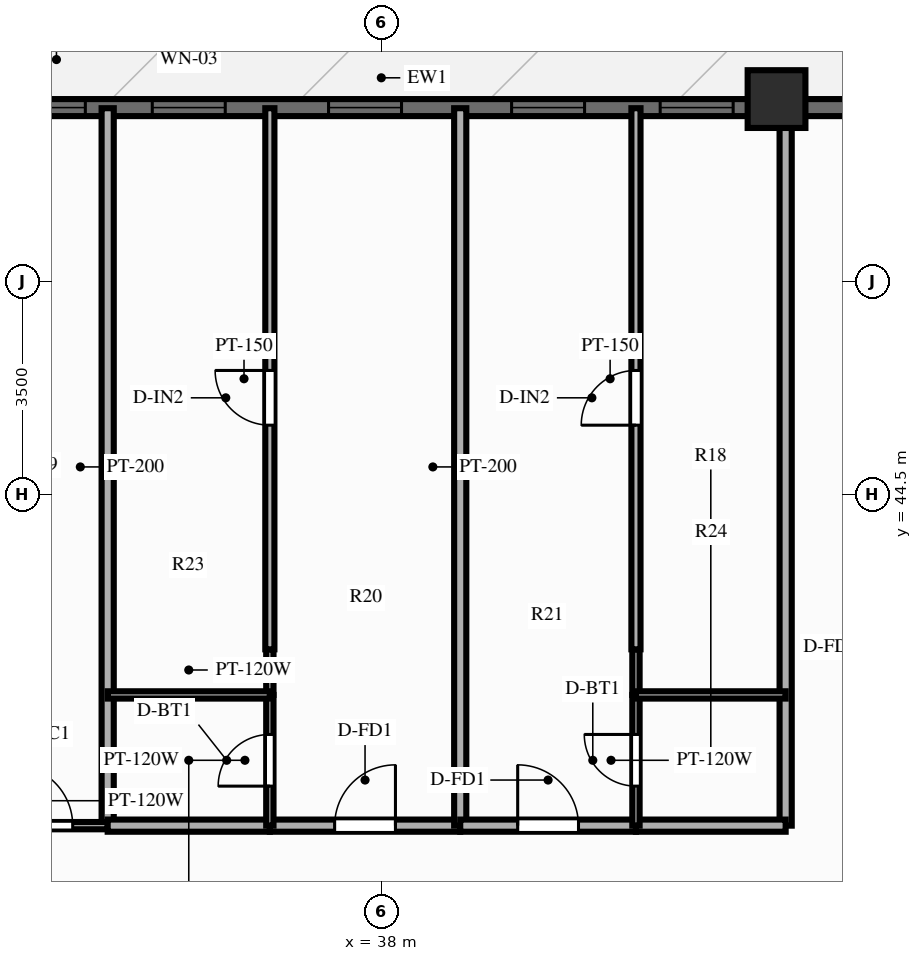
"""IFC4 building model, lengths in metres.
Left out: names, types, materials, properties, quantities, classifications, styles, units other than length and angle.
Written with IfcOpenShell. Run it as: python <this file> out.ifc"""

import sys

from ifc_helpers import new_model, si_unit, direction, frame, frame_2d, origin, origin_2d, place, context, subcontext, project, spatial, rectangle, extrude, source, transform, mapped, element, fill, save


model = new_model("IFC4")
c1 = context("Model", 3, precision=1e-05, world=origin(), true_north=direction((0.0, 1.0)))
c2 = subcontext(c1, "Body", "Model", "MODEL_VIEW")
j1 = project(units=[si_unit("LENGTHUNIT", "METRE"), si_unit("PLANEANGLEUNIT", "RADIAN")], contexts=[c1])
p1 = place(None, origin())
s1 = spatial("IfcSite", under=j1, at=p1, CompositionType="ELEMENT")
p2 = place(p1, origin())
s2 = spatial("IfcBuilding", under=s1, at=p2, CompositionType="ELEMENT")
p3 = place(p2, frame((0.0, 0.0, 101.85)))
s3 = spatial("IfcBuildingStorey", under=s2, at=p3, CompositionType="ELEMENT", Elevation=101.85)
m1 = source(origin(), c2, "Body", "SweptSolid", [
    extrude(rectangle(XDim=0.95, YDim=0.95, at=origin_2d()), origin(), (0.0, 0.0, 1.0), 3.0),
])
p4 = place(p3, frame((44.5, 51.0, 0.0), z_axis=(0.0, 0.0, 1.0), x_axis=(1.0, 0.0, 0.0)))
e1 = element("IfcColumn", 1, at=p4, inside=s3, PredefinedType="COLUMN", context=c2, shape_type="MappedRepresentation", body=[
    mapped(m1, transform((0.0, 0.0, 0.0), scale=1.0)),
])
p5 = place(p3, frame((16.2, 50.86, 0.0), z_axis=(0.0, 0.0, 1.0), x_axis=(1.0, 0.0, 0.0)))
e2 = element("IfcWall", 2, at=p5, inside=s3, PredefinedType="SOLIDWALL", context=c2, shape_type="SweptSolid", body=[
    extrude(rectangle(XDim=43.6, YDim=0.28, at=frame_2d((21.8, 0.0))), origin(), (0.0, 0.0, 1.0), 2.28),
])
p6 = place(p5, frame((7.1, 0.0, 0.0)))
e3 = element("IfcOpeningElement", 3, at=p6, cuts=e2, PredefinedType="OPENING", context=c2, shape_type="SweptSolid", body=[
    extrude(rectangle(XDim=1.1, YDim=2.15, at=frame_2d((0.55, 1.075))), frame((0.0, 0.152, 0.0), z_axis=(0.0, -1.0, 0.0), x_axis=(1.0, 0.0, 0.0)), (0.0, 0.0, 1.0), 0.304),
])
p7 = place(p5, frame((15.982, 0.0, 0.25)))
e4 = element("IfcOpeningElement", 4, at=p7, cuts=e2, PredefinedType="OPENING", context=c2, shape_type="SweptSolid", body=[
    extrude(rectangle(XDim=0.95, YDim=1.5, at=frame_2d((0.475, 0.75))), frame((0.0, 0.152, 0.0), z_axis=(0.0, -1.0, 0.0), x_axis=(1.0, 0.0, 0.0)), (0.0, 0.0, 1.0), 0.304),
])
p8 = place(p5, frame((18.033, 0.0, 0.25)))
e5 = element("IfcOpeningElement", 5, at=p8, cuts=e2, PredefinedType="OPENING", context=c2, shape_type="SweptSolid", body=[
    extrude(rectangle(XDim=1.2, YDim=1.5, at=frame_2d((0.6, 0.75))), frame((0.0, 0.152, 0.0), z_axis=(0.0, -1.0, 0.0), x_axis=(1.0, 0.0, 0.0)), (0.0, 0.0, 1.0), 0.304),
])
p9 = place(p5, frame((20.933, 0.0, 0.25)))
e6 = element("IfcOpeningElement", 6, at=p9, cuts=e2, PredefinedType="OPENING", context=c2, shape_type="SweptSolid", body=[
    extrude(rectangle(XDim=1.2, YDim=1.5, at=frame_2d((0.6, 0.75))), frame((0.0, 0.152, 0.0), z_axis=(0.0, -1.0, 0.0), x_axis=(1.0, 0.0, 0.0)), (0.0, 0.0, 1.0), 0.304),
])
p10 = place(p5, frame((23.943, 0.0, 0.25)))
e7 = element("IfcOpeningElement", 7, at=p10, cuts=e2, PredefinedType="OPENING", context=c2, shape_type="SweptSolid", body=[
    extrude(rectangle(XDim=1.2, YDim=1.5, at=frame_2d((0.6, 0.75))), frame((0.0, 0.152, 0.0), z_axis=(0.0, -1.0, 0.0), x_axis=(1.0, 0.0, 0.0)), (0.0, 0.0, 1.0), 0.304),
])
p11 = place(p5, frame((26.386, 0.0, 0.25)))
e8 = element("IfcOpeningElement", 8, at=p11, cuts=e2, PredefinedType="OPENING", context=c2, shape_type="SweptSolid", body=[
    extrude(rectangle(XDim=1.2, YDim=1.5, at=frame_2d((0.6, 0.75))), frame((0.0, 0.152, 0.0), z_axis=(0.0, -1.0, 0.0), x_axis=(1.0, 0.0, 0.0)), (0.0, 0.0, 1.0), 0.304),
])
p12 = place(p5, frame((35.35, 0.0, 0.25)))
e9 = element("IfcOpeningElement", 9, at=p12, cuts=e2, PredefinedType="OPENING", context=c2, shape_type="SweptSolid", body=[
    extrude(rectangle(XDim=1.2, YDim=1.5, at=frame_2d((0.6, 0.75))), frame((0.0, 0.152, 0.0), z_axis=(0.0, -1.0, 0.0), x_axis=(1.0, 0.0, 0.0)), (0.0, 0.0, 1.0), 0.304),
])
p13 = place(p3, frame((44.65, 39.05, 0.0), z_axis=(0.0, 0.0, 1.0), x_axis=(0.0, 1.0, 0.0)))
e10 = element("IfcWall", 10, at=p13, inside=s3, PredefinedType="PARTITIONING", context=c2, shape_type="SweptSolid", body=[
    extrude(rectangle(XDim=11.8, YDim=0.2, at=frame_2d((5.9, 0.0))), origin(), (0.0, 0.0, 1.0), 2.34),
])
p14 = place(p3, frame((33.5, 39.05, 0.0), z_axis=(0.0, 0.0, 1.0), x_axis=(0.0, 1.0, 0.0)))
e11 = element("IfcWall", 11, at=p14, inside=s3, PredefinedType="PARTITIONING", context=c2, shape_type="SweptSolid", body=[
    extrude(rectangle(XDim=11.8, YDim=0.2, at=frame_2d((5.9, 0.0))), origin(), (0.0, 0.0, 1.0), 2.79),
])
p15 = place(p3, frame((31.35, 39.05, 0.0), z_axis=(0.0, 0.0, 1.0), x_axis=(1.0, 0.0, 0.0)))
e12 = element("IfcWall", 12, at=p15, inside=s3, PredefinedType="PARTITIONING", context=c2, shape_type="SweptSolid", body=[
    extrude(rectangle(XDim=2.15, YDim=0.12, at=frame_2d((1.075, 0.0))), origin(), (0.0, 0.0, 1.0), 2.79),
])
p16 = place(p15, frame((0.575, 0.0, 0.0)))
e13 = element("IfcOpeningElement", 13, at=p16, cuts=e12, PredefinedType="OPENING", context=c2, shape_type="SweptSolid", body=[
    extrude(rectangle(XDim=1.0, YDim=2.1, at=frame_2d((0.5, 1.05))), frame((0.0, 0.072, 0.0), z_axis=(0.0, -1.0, 0.0), x_axis=(1.0, 0.0, 0.0)), (0.0, 0.0, 1.0), 0.144),
])
p17 = place(p3, frame((33.5, 39.05, 0.0), z_axis=(0.0, 0.0, 1.0), x_axis=(1.0, 0.0, 0.0)))
e14 = element("IfcWall", 14, at=p17, inside=s3, PredefinedType="PARTITIONING", context=c2, shape_type="SweptSolid", body=[
    extrude(rectangle(XDim=2.667, YDim=0.2, at=frame_2d((1.333, 0.0))), origin(), (0.0, 0.0, 1.0), 2.79),
])
p18 = place(p3, frame((36.167, 39.05, 0.0), z_axis=(0.0, 0.0, 1.0), x_axis=(1.0, 0.0, 0.0)))
e15 = element("IfcWall", 15, at=p18, inside=s3, PredefinedType="PARTITIONING", context=c2, shape_type="SweptSolid", body=[
    extrude(rectangle(XDim=3.131, YDim=0.2, at=frame_2d((1.565, 0.0))), origin(), (0.0, 0.0, 1.0), 2.79),
])
p19 = place(p18, frame((1.065, 0.0, 0.0)))
e16 = element("IfcOpeningElement", 16, at=p19, cuts=e15, PredefinedType="OPENING", context=c2, shape_type="SweptSolid", body=[
    extrude(rectangle(XDim=1.0, YDim=2.15, at=frame_2d((0.5, 1.075))), frame((0.0, 0.112, 0.0), z_axis=(0.0, -1.0, 0.0), x_axis=(1.0, 0.0, 0.0)), (0.0, 0.0, 1.0), 0.224),
])
p20 = place(p3, frame((36.167, 39.05, 0.0), z_axis=(0.0, 0.0, 1.0), x_axis=(0.0, 1.0, 0.0)))
e17 = element("IfcWall", 17, at=p20, inside=s3, PredefinedType="PARTITIONING", context=c2, shape_type="SweptSolid", body=[
    extrude(rectangle(XDim=2.15, YDim=0.12, at=frame_2d((1.075, 0.0))), origin(), (0.0, 0.0, 1.0), 2.79),
])
p21 = place(p20, frame((0.65, 0.0, 0.0)))
e18 = element("IfcOpeningElement", 18, at=p21, cuts=e17, PredefinedType="OPENING", context=c2, shape_type="SweptSolid", body=[
    extrude(rectangle(XDim=0.85, YDim=2.05, at=frame_2d((0.425, 1.025))), frame((0.0, 0.072, 0.0), z_axis=(0.0, -1.0, 0.0), x_axis=(1.0, 0.0, 0.0)), (0.0, 0.0, 1.0), 0.144),
])
p22 = place(p3, frame((36.167, 41.2, 0.0), z_axis=(0.0, 0.0, 1.0), x_axis=(0.0, 1.0, 0.0)))
e19 = element("IfcWall", 19, at=p22, inside=s3, PredefinedType="PARTITIONING", context=c2, shape_type="SweptSolid", body=[
    extrude(rectangle(XDim=0.75, YDim=0.12, at=frame_2d((0.375, 0.0))), origin(), (0.0, 0.0, 1.0), 2.79),
])
p23 = place(p3, frame((33.5, 41.2, 0.0), z_axis=(0.0, 0.0, 1.0), x_axis=(1.0, 0.0, 0.0)))
e20 = element("IfcWall", 20, at=p23, inside=s3, PredefinedType="PARTITIONING", context=c2, shape_type="SweptSolid", body=[
    extrude(rectangle(XDim=2.667, YDim=0.12, at=frame_2d((1.333, 0.0))), origin(), (0.0, 0.0, 1.0), 2.79),
])
p24 = place(p3, frame((36.167, 41.95, 0.0), z_axis=(0.0, 0.0, 1.0), x_axis=(0.0, 1.0, 0.0)))
e21 = element("IfcWall", 21, at=p24, inside=s3, PredefinedType="PARTITIONING", context=c2, shape_type="SweptSolid", body=[
    extrude(rectangle(XDim=8.9, YDim=0.15, at=frame_2d((4.45, 0.0))), origin(), (0.0, 0.0, 1.0), 2.79),
])
p25 = place(p24, frame((3.687, 0.0, 0.0)))
e22 = element("IfcOpeningElement", 22, at=p25, cuts=e21, PredefinedType="OPENING", context=c2, shape_type="SweptSolid", body=[
    extrude(rectangle(XDim=0.9, YDim=2.1, at=frame_2d((0.45, 1.05))), frame((0.0, 0.087, 0.0), z_axis=(0.0, -1.0, 0.0), x_axis=(1.0, 0.0, 0.0)), (0.0, 0.0, 1.0), 0.174),
])
p26 = place(p3, frame((39.298, 39.05, 0.0), z_axis=(0.0, 0.0, 1.0), x_axis=(0.0, 1.0, 0.0)))
e23 = element("IfcWall", 23, at=p26, inside=s3, PredefinedType="PARTITIONING", context=c2, shape_type="SweptSolid", body=[
    extrude(rectangle(XDim=11.8, YDim=0.2, at=frame_2d((5.9, 0.0))), origin(), (0.0, 0.0, 1.0), 2.79),
])
p27 = place(p3, frame((39.298, 39.05, 0.0), z_axis=(0.0, 0.0, 1.0), x_axis=(1.0, 0.0, 0.0)))
e24 = element("IfcWall", 24, at=p27, inside=s3, PredefinedType="PARTITIONING", context=c2, shape_type="SweptSolid", body=[
    extrude(rectangle(XDim=2.89, YDim=0.2, at=frame_2d((1.445, 0.0))), origin(), (0.0, 0.0, 1.0), 2.79),
])
p28 = place(p27, frame((0.945, 0.0, 0.0)))
e25 = element("IfcOpeningElement", 25, at=p28, cuts=e24, PredefinedType="OPENING", context=c2, shape_type="SweptSolid", body=[
    extrude(rectangle(XDim=1.0, YDim=2.15, at=frame_2d((0.5, 1.075))), frame((0.0, 0.112, 0.0), z_axis=(0.0, -1.0, 0.0), x_axis=(1.0, 0.0, 0.0)), (0.0, 0.0, 1.0), 0.224),
])
p29 = place(p3, frame((42.188, 39.05, 0.0), z_axis=(0.0, 0.0, 1.0), x_axis=(1.0, 0.0, 0.0)))
e26 = element("IfcWall", 26, at=p29, inside=s3, PredefinedType="PARTITIONING", context=c2, shape_type="SweptSolid", body=[
    extrude(rectangle(XDim=2.462, YDim=0.2, at=frame_2d((1.231, 0.0))), origin(), (0.0, 0.0, 1.0), 2.79),
])
p30 = place(p3, frame((42.188, 39.05, 0.0), z_axis=(0.0, 0.0, 1.0), x_axis=(0.0, 1.0, 0.0)))
e27 = element("IfcWall", 27, at=p30, inside=s3, PredefinedType="PARTITIONING", context=c2, shape_type="SweptSolid", body=[
    extrude(rectangle(XDim=2.15, YDim=0.12, at=frame_2d((1.075, 0.0))), origin(), (0.0, 0.0, 1.0), 2.79),
])
p31 = place(p30, frame((0.65, 0.0, 0.0)))
e28 = element("IfcOpeningElement", 28, at=p31, cuts=e27, PredefinedType="OPENING", context=c2, shape_type="SweptSolid", body=[
    extrude(rectangle(XDim=0.85, YDim=2.05, at=frame_2d((0.425, 1.025))), frame((0.0, 0.072, 0.0), z_axis=(0.0, -1.0, 0.0), x_axis=(1.0, 0.0, 0.0)), (0.0, 0.0, 1.0), 0.144),
])
p32 = place(p3, frame((42.188, 41.2, 0.0), z_axis=(0.0, 0.0, 1.0), x_axis=(0.0, 1.0, 0.0)))
e29 = element("IfcWall", 29, at=p32, inside=s3, PredefinedType="PARTITIONING", context=c2, shape_type="SweptSolid", body=[
    extrude(rectangle(XDim=0.75, YDim=0.12, at=frame_2d((0.375, 0.0))), origin(), (0.0, 0.0, 1.0), 2.79),
])
p33 = place(p3, frame((42.188, 41.2, 0.0), z_axis=(0.0, 0.0, 1.0), x_axis=(1.0, 0.0, 0.0)))
e30 = element("IfcWall", 30, at=p33, inside=s3, PredefinedType="PARTITIONING", context=c2, shape_type="SweptSolid", body=[
    extrude(rectangle(XDim=2.462, YDim=0.12, at=frame_2d((1.231, 0.0))), origin(), (0.0, 0.0, 1.0), 2.79),
])
p34 = place(p3, frame((42.188, 41.95, 0.0), z_axis=(0.0, 0.0, 1.0), x_axis=(0.0, 1.0, 0.0)))
e31 = element("IfcWall", 31, at=p34, inside=s3, PredefinedType="PARTITIONING", context=c2, shape_type="SweptSolid", body=[
    extrude(rectangle(XDim=8.9, YDim=0.15, at=frame_2d((4.45, 0.0))), origin(), (0.0, 0.0, 1.0), 2.79),
])
p35 = place(p34, frame((3.687, 0.0, 0.0)))
e32 = element("IfcOpeningElement", 32, at=p35, cuts=e31, PredefinedType="OPENING", context=c2, shape_type="SweptSolid", body=[
    extrude(rectangle(XDim=0.9, YDim=2.1, at=frame_2d((0.45, 1.05))), frame((0.0, 0.087, 0.0), z_axis=(0.0, -1.0, 0.0), x_axis=(1.0, 0.0, 0.0)), (0.0, 0.0, 1.0), 0.174),
])
m2 = source(origin(), c2, "Body", "SweptSolid", [
    extrude(rectangle(XDim=0.95, YDim=1.5, at=frame_2d((0.475, 0.75))), frame((0.0, 0.03, 0.0), z_axis=(0.0, -1.0, 0.0), x_axis=(1.0, 0.0, 0.0)), (0.0, 0.0, 1.0), 0.06),
])
p36 = place(p7, origin())
e33 = element("IfcWindow", 33, at=p36, inside=s3, PartitioningType="SINGLE_PANEL", PredefinedType="WINDOW", context=c2, shape_type="MappedRepresentation", body=[
    mapped(m2, transform((0.0, 0.0, 0.0), scale=1.0)),
])
fill(e4, e33)
m3 = source(origin(), c2, "Body", "SweptSolid", [
    extrude(rectangle(XDim=1.2, YDim=1.5, at=frame_2d((0.6, 0.75))), frame((0.0, 0.03, 0.0), z_axis=(0.0, -1.0, 0.0), x_axis=(1.0, 0.0, 0.0)), (0.0, 0.0, 1.0), 0.06),
])
p37 = place(p8, origin())
e34 = element("IfcWindow", 34, at=p37, inside=s3, PartitioningType="SINGLE_PANEL", PredefinedType="WINDOW", context=c2, shape_type="MappedRepresentation", body=[
    mapped(m3, transform((0.0, 0.0, 0.0), scale=1.0)),
])
fill(e5, e34)
p38 = place(p9, origin())
e35 = element("IfcWindow", 35, at=p38, inside=s3, PartitioningType="SINGLE_PANEL", PredefinedType="WINDOW", context=c2, shape_type="MappedRepresentation", body=[
    mapped(m3, transform((0.0, 0.0, 0.0), scale=1.0)),
])
fill(e6, e35)
p39 = place(p10, origin())
e36 = element("IfcWindow", 36, at=p39, inside=s3, PartitioningType="SINGLE_PANEL", PredefinedType="WINDOW", context=c2, shape_type="MappedRepresentation", body=[
    mapped(m3, transform((0.0, 0.0, 0.0), scale=1.0)),
])
fill(e7, e36)
p40 = place(p11, origin())
e37 = element("IfcWindow", 37, at=p40, inside=s3, PartitioningType="SINGLE_PANEL", PredefinedType="WINDOW", context=c2, shape_type="MappedRepresentation", body=[
    mapped(m3, transform((0.0, 0.0, 0.0), scale=1.0)),
])
fill(e8, e37)
m4 = source(origin(), c2, "Body", "SweptSolid", [
    extrude(rectangle(XDim=1.0, YDim=2.1, at=frame_2d((0.5, 1.05))), frame((0.0, 0.025, 0.0), z_axis=(0.0, -1.0, 0.0), x_axis=(1.0, 0.0, 0.0)), (0.0, 0.0, 1.0), 0.05),
])
p41 = place(p16, origin())
e38 = element("IfcDoor", 38, at=p41, inside=s3, OperationType="SINGLE_SWING_LEFT", PredefinedType="DOOR", context=c2, shape_type="MappedRepresentation", body=[
    mapped(m4, transform((0.0, 0.0, 0.0), scale=1.0)),
])
fill(e13, e38)
m5 = source(origin(), c2, "Body", "SweptSolid", [
    extrude(rectangle(XDim=1.0, YDim=2.15, at=frame_2d((0.5, 1.075))), frame((0.0, 0.025, 0.0), z_axis=(0.0, -1.0, 0.0), x_axis=(1.0, 0.0, 0.0)), (0.0, 0.0, 1.0), 0.05),
])
p42 = place(p19, origin())
e39 = element("IfcDoor", 39, at=p42, inside=s3, OperationType="SINGLE_SWING_RIGHT", PredefinedType="DOOR", context=c2, shape_type="MappedRepresentation", body=[
    mapped(m5, transform((0.0, 0.0, 0.0), scale=1.0)),
])
fill(e16, e39)
m6 = source(origin(), c2, "Body", "SweptSolid", [
    extrude(rectangle(XDim=0.85, YDim=2.05, at=frame_2d((0.425, 1.025))), frame((0.0, 0.025, 0.0), z_axis=(0.0, -1.0, 0.0), x_axis=(1.0, 0.0, 0.0)), (0.0, 0.0, 1.0), 0.05),
])
p43 = place(p21, origin())
e40 = element("IfcDoor", 40, at=p43, inside=s3, OperationType="SINGLE_SWING_LEFT", PredefinedType="DOOR", context=c2, shape_type="MappedRepresentation", body=[
    mapped(m6, transform((0.0, 0.0, 0.0), scale=1.0)),
])
fill(e18, e40)
m7 = source(origin(), c2, "Body", "SweptSolid", [
    extrude(rectangle(XDim=0.9, YDim=2.1, at=frame_2d((0.45, 1.05))), frame((0.0, 0.025, 0.0), z_axis=(0.0, -1.0, 0.0), x_axis=(1.0, 0.0, 0.0)), (0.0, 0.0, 1.0), 0.05),
])
p44 = place(p25, origin())
e41 = element("IfcDoor", 41, at=p44, inside=s3, OperationType="SINGLE_SWING_RIGHT", PredefinedType="DOOR", context=c2, shape_type="MappedRepresentation", body=[
    mapped(m7, transform((0.0, 0.0, 0.0), scale=1.0)),
])
fill(e22, e41)
p45 = place(p28, origin())
e42 = element("IfcDoor", 42, at=p45, inside=s3, OperationType="SINGLE_SWING_LEFT", PredefinedType="DOOR", context=c2, shape_type="MappedRepresentation", body=[
    mapped(m5, transform((0.0, 0.0, 0.0), scale=1.0)),
])
fill(e25, e42)
p46 = place(p31, origin())
e43 = element("IfcDoor", 43, at=p46, inside=s3, OperationType="SINGLE_SWING_RIGHT", PredefinedType="DOOR", context=c2, shape_type="MappedRepresentation", body=[
    mapped(m6, transform((0.0, 0.0, 0.0), scale=1.0)),
])
fill(e28, e43)
p47 = place(p35, origin())
e44 = element("IfcDoor", 44, at=p47, inside=s3, OperationType="SINGLE_SWING_LEFT", PredefinedType="DOOR", context=c2, shape_type="MappedRepresentation", body=[
    mapped(m7, transform((0.0, 0.0, 0.0), scale=1.0)),
])
fill(e32, e44)
save(model, sys.argv[1])
